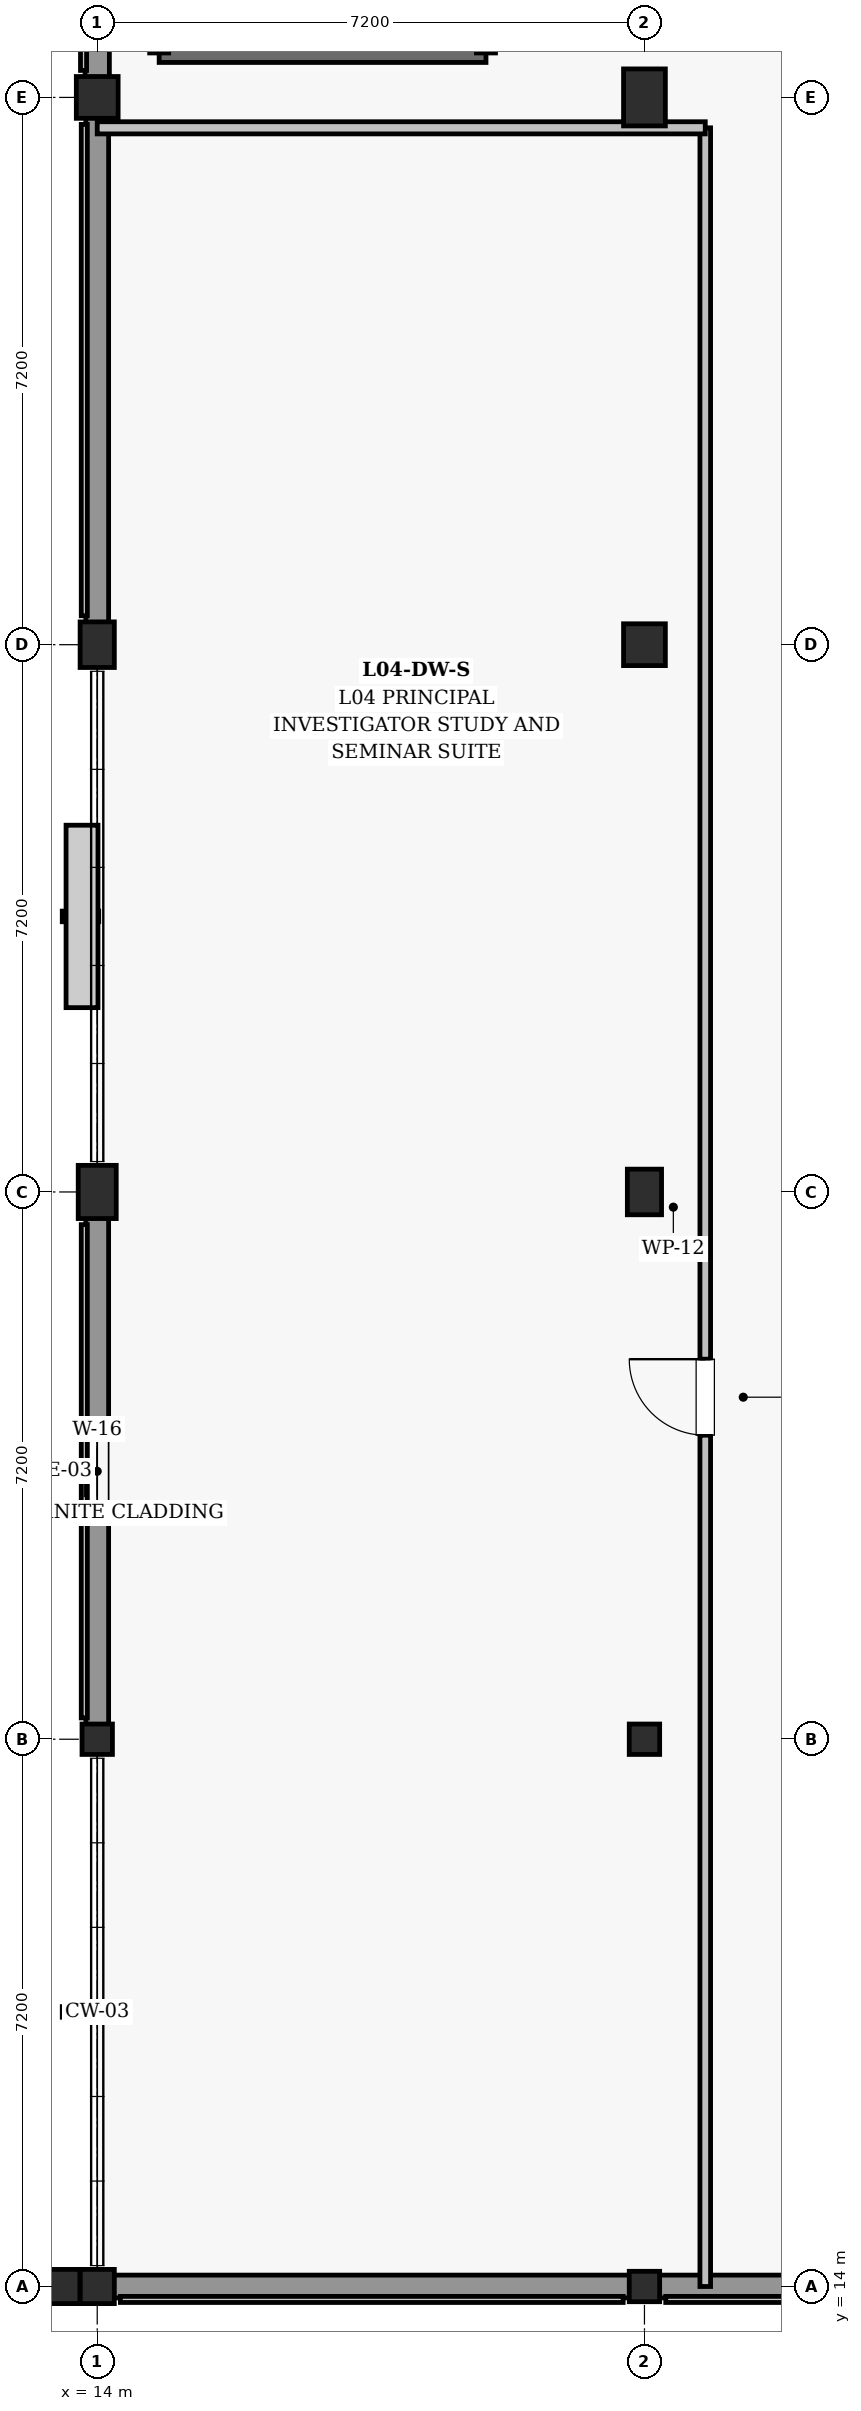
"""IFC4 building model, lengths in metres.
Left out: names, types, materials, properties, quantities, classifications, styles, units other than length and angle.
Written with IfcOpenShell. Run it as: python <this file> out.ifc"""

import sys

from ifc_helpers import new_model, si_unit, direction, frame, frame_2d, origin, origin_2d, place, context, subcontext, project, spatial, rectangle, extrude, element, fill, save


model = new_model("IFC4")
c1 = context("Model", 3, precision=1e-05, world=origin(), true_north=direction((0.0, 1.0)))
c2 = subcontext(c1, "Body", "Model", "MODEL_VIEW")
j1 = project(units=[si_unit("LENGTHUNIT", "METRE"), si_unit("PLANEANGLEUNIT", "RADIAN")], contexts=[c1])
p1 = place(None, origin())
s1 = spatial("IfcSite", under=j1, at=p1, CompositionType="ELEMENT")
p2 = place(p1, origin())
s2 = spatial("IfcBuilding", under=s1, at=p2, CompositionType="ELEMENT")
p3 = place(p2, frame((0.0, 0.0, 18.9)))
s3 = spatial("IfcBuildingStorey", under=s2, at=p3, CompositionType="ELEMENT", Elevation=18.9)
p4 = place(p3, frame((14.0, 14.0, 0.0), z_axis=(0.0, 0.0, 1.0), x_axis=(1.0, 0.0, 0.0)))
e1 = element("IfcColumn", 1, at=p4, inside=s3, PredefinedType="COLUMN", context=c2, shape_type="SweptSolid", body=[
    extrude(rectangle(XDim=0.45, YDim=0.45, at=origin_2d()), origin(), (0.0, 0.0, 1.0), 4.5),
])
p5 = place(p3, frame((14.0, 21.2, 0.0), z_axis=(0.0, 0.0, 1.0), x_axis=(1.0, 0.0, 0.0)))
e2 = element("IfcColumn", 2, at=p5, inside=s3, PredefinedType="COLUMN", context=c2, shape_type="SweptSolid", body=[
    extrude(rectangle(XDim=0.4, YDim=0.4, at=origin_2d()), origin(), (0.0, 0.0, 1.0), 4.5),
])
p6 = place(p3, frame((14.0, 28.4, 0.0), z_axis=(0.0, 0.0, 1.0), x_axis=(1.0, 0.0, 0.0)))
e3 = element("IfcColumn", 3, at=p6, inside=s3, PredefinedType="COLUMN", context=c2, shape_type="SweptSolid", body=[
    extrude(rectangle(XDim=0.5, YDim=0.7, at=origin_2d()), origin(), (0.0, 0.0, 1.0), 4.5),
])
p7 = place(p3, frame((14.0, 35.6, 0.0), z_axis=(0.0, 0.0, 1.0), x_axis=(1.0, 0.0, 0.0)))
e4 = element("IfcColumn", 4, at=p7, inside=s3, PredefinedType="COLUMN", context=c2, shape_type="SweptSolid", body=[
    extrude(rectangle(XDim=0.45, YDim=0.6, at=origin_2d()), origin(), (0.0, 0.0, 1.0), 4.5),
])
p8 = place(p3, frame((14.0, 42.8, 0.0), z_axis=(0.0, 0.0, 1.0), x_axis=(1.0, 0.0, 0.0)))
e5 = element("IfcColumn", 5, at=p8, inside=s3, PredefinedType="COLUMN", context=c2, shape_type="SweptSolid", body=[
    extrude(rectangle(XDim=0.55, YDim=0.55, at=origin_2d()), origin(), (0.0, 0.0, 1.0), 4.5),
])
for number, where, z_axis, x_axis in (
    (6, (21.2, 14.0, 0.0), (0.0, 0.0, 1.0), (1.0, 0.0, 0.0)),
    (7, (21.2, 21.2, 0.0), (0.0, 0.0, 1.0), (1.0, 0.0, 0.0)),
):
    element("IfcColumn", number, at=place(p3, frame(where, z_axis=z_axis, x_axis=x_axis)), inside=s3, PredefinedType="COLUMN", context=c2, shape_type="SweptSolid", body=[
        extrude(rectangle(XDim=0.4, YDim=0.4, at=origin_2d()), origin(), (0.0, 0.0, 1.0), 4.5),
    ])
p9 = place(p3, frame((21.2, 28.4, 0.0), z_axis=(0.0, 0.0, 1.0), x_axis=(1.0, 0.0, 0.0)))
e8 = element("IfcColumn", 8, at=p9, inside=s3, PredefinedType="COLUMN", context=c2, shape_type="SweptSolid", body=[
    extrude(rectangle(XDim=0.45, YDim=0.6, at=origin_2d()), origin(), (0.0, 0.0, 1.0), 4.5),
])
p10 = place(p3, frame((21.2, 35.6, 0.0), z_axis=(0.0, 0.0, 1.0), x_axis=(1.0, 0.0, 0.0)))
e9 = element("IfcColumn", 9, at=p10, inside=s3, PredefinedType="COLUMN", context=c2, shape_type="SweptSolid", body=[
    extrude(rectangle(XDim=0.55, YDim=0.55, at=origin_2d()), origin(), (0.0, 0.0, 1.0), 4.5),
])
p11 = place(p3, frame((21.2, 42.8, 0.0), z_axis=(0.0, 0.0, 1.0), x_axis=(1.0, 0.0, 0.0)))
e10 = element("IfcColumn", 10, at=p11, inside=s3, PredefinedType="COLUMN", context=c2, shape_type="SweptSolid", body=[
    extrude(rectangle(XDim=0.55, YDim=0.75, at=origin_2d()), origin(), (0.0, 0.0, 1.0), 4.5),
])
p12 = place(p3, frame((13.447, 14.0, 0.0), z_axis=(0.0, 0.0, 1.0), x_axis=(0.0, 1.0, 0.0)))
e11 = element("IfcColumn", 11, at=p12, inside=s3, PredefinedType="PILASTER", context=c2, shape_type="SweptSolid", body=[
    extrude(rectangle(XDim=0.45, YDim=0.65, at=origin_2d()), origin(), (0.0, 0.0, 1.0), 4.5),
])
p13 = place(p3, frame((14.0, 21.38, 0.0), z_axis=(0.0, 0.0, 1.0), x_axis=(0.0, 1.0, 0.0)))
e12 = element("IfcWall", 12, at=p13, inside=s3, PredefinedType="SOLIDWALL", context=c2, shape_type="SweptSolid", body=[
    extrude(rectangle(XDim=6.69, YDim=0.3, at=frame_2d((3.345, 0.0))), origin(), (0.0, 0.0, 1.0), 3.455),
])
p14 = place(p13, frame((2.77, 0.0, 0.95)))
e13 = element("IfcOpeningElement", 13, at=p14, cuts=e12, PredefinedType="OPENING", context=c2, shape_type="SweptSolid", body=[
    extrude(rectangle(XDim=1.15, YDim=2.25, at=frame_2d((0.575, 1.125))), frame((0.0, 0.16, 0.0), z_axis=(0.0, -1.0, 0.0), x_axis=(1.0, 0.0, 0.0)), (0.0, 0.0, 1.0), 0.32),
])
p15 = place(p3, frame((14.0, 35.88, 0.0), z_axis=(0.0, 0.0, 1.0), x_axis=(0.0, 1.0, 0.0)))
e14 = element("IfcWall", 14, at=p15, inside=s3, PredefinedType="SOLIDWALL", context=c2, shape_type="SweptSolid", body=[
    extrude(rectangle(XDim=6.665, YDim=0.3, at=frame_2d((3.333, 0.0))), origin(), (0.0, 0.0, 1.0), 3.375),
])
p16 = place(p3, frame((14.0, 43.055, 0.0), z_axis=(0.0, 0.0, 1.0), x_axis=(0.0, 1.0, 0.0)))
e15 = element("IfcWall", 15, at=p16, inside=s3, PredefinedType="SOLIDWALL", context=c2, shape_type="SweptSolid", body=[
    extrude(rectangle(XDim=6.665, YDim=0.32, at=frame_2d((3.333, 0.0))), origin(), (0.0, 0.0, 1.0), 3.375),
])
p17 = place(p3, frame((14.205, 14.0, 0.0), z_axis=(0.0, 0.0, 1.0), x_axis=(1.0, 0.0, 0.0)))
e16 = element("IfcWall", 16, at=p17, inside=s3, PredefinedType="SOLIDWALL", context=c2, shape_type="SweptSolid", body=[
    extrude(rectangle(XDim=6.815, YDim=0.3, at=frame_2d((3.407, 0.0))), origin(), (0.0, 0.0, 1.0), 3.475),
])
p18 = place(p3, frame((21.38, 14.0, 0.0), z_axis=(0.0, 0.0, 1.0), x_axis=(1.0, 0.0, 0.0)))
e17 = element("IfcWall", 17, at=p18, inside=s3, PredefinedType="SOLIDWALL", context=c2, shape_type="SweptSolid", body=[
    extrude(rectangle(XDim=6.79, YDim=0.3, at=frame_2d((3.395, 0.0))), origin(), (0.0, 0.0, 1.0), 3.475),
])
p19 = place(p3, frame((14.815, 43.385, 0.0), z_axis=(0.0, 0.0, 1.0), x_axis=(1.0, 0.0, 0.0)))
e18 = element("IfcWall", 18, at=p19, inside=s3, PredefinedType="SHEAR", context=c2, shape_type="SweptSolid", body=[
    extrude(rectangle(XDim=4.3, YDim=0.25, at=frame_2d((2.15, 0.0))), origin(), (0.0, 0.0, 1.0), 4.195),
])
p20 = place(p3, frame((19.115, 43.385, 0.0), z_axis=(0.0, 0.0, 1.0), x_axis=(0.0, 1.0, 0.0)))
e19 = element("IfcWall", 19, at=p20, inside=s3, PredefinedType="SHEAR", context=c2, shape_type="SweptSolid", body=[
    extrude(rectangle(XDim=10.63, YDim=0.25, at=frame_2d((5.315, 0.0))), origin(), (0.0, 0.0, 1.0), 4.195),
])
p21 = place(p20, frame((0.55, 0.0, 0.0)))
e20 = element("IfcOpeningElement", 20, at=p21, cuts=e19, PredefinedType="OPENING", context=c2, shape_type="SweptSolid", body=[
    extrude(rectangle(XDim=1.2, YDim=2.15, at=frame_2d((0.6, 1.075))), frame((0.0, 0.135, 0.0), z_axis=(0.0, -1.0, 0.0), x_axis=(1.0, 0.0, 0.0)), (0.0, 0.0, 1.0), 0.27),
])
p22 = place(p3, frame((14.815, 54.015, 0.0), z_axis=(0.0, 0.0, 1.0), x_axis=(0.0, -1.0, 0.0)))
e21 = element("IfcWall", 21, at=p22, inside=s3, PredefinedType="SHEAR", context=c2, shape_type="SweptSolid", body=[
    extrude(rectangle(XDim=10.63, YDim=0.25, at=frame_2d((5.315, 0.0))), origin(), (0.0, 0.0, 1.0), 4.195),
])
p23 = place(p3, frame((22.0, 14.0, 0.0), z_axis=(0.0, 0.0, 1.0), x_axis=(0.0, 1.0, 0.0)))
e22 = element("IfcWall", 22, at=p23, inside=s3, PredefinedType="PARTITIONING", context=c2, shape_type="SweptSolid", body=[
    extrude(rectangle(XDim=28.4, YDim=0.14, at=frame_2d((14.2, 0.0))), origin(), (0.0, 0.0, 1.0), 3.48),
])
p24 = place(p23, frame((11.2, 0.0, 0.0)))
e23 = element("IfcOpeningElement", 23, at=p24, cuts=e22, PredefinedType="OPENING", context=c2, shape_type="SweptSolid", body=[
    extrude(rectangle(XDim=1.0, YDim=2.15, at=frame_2d((0.5, 1.075))), frame((0.0, 0.08, 0.0), z_axis=(0.0, -1.0, 0.0), x_axis=(1.0, 0.0, 0.0)), (0.0, 0.0, 1.0), 0.16),
])
p25 = place(p3, frame((14.0, 42.4, 0.0), z_axis=(0.0, 0.0, 1.0), x_axis=(1.0, 0.0, 0.0)))
e24 = element("IfcWall", 24, at=p25, inside=s3, PredefinedType="PARTITIONING", context=c2, shape_type="SweptSolid", body=[
    extrude(rectangle(XDim=8.0, YDim=0.16, at=frame_2d((4.0, 0.0))), origin(), (0.0, 0.0, 1.0), 3.58),
])
p26 = place(p14, origin())
e25 = element("IfcWindow", 25, at=p26, inside=s3, PartitioningType="SINGLE_PANEL", PredefinedType="WINDOW", context=c2, shape_type="SweptSolid", body=[
    extrude(rectangle(XDim=1.15, YDim=2.25, at=frame_2d((0.575, 1.125))), frame((0.0, 0.03, 0.0), z_axis=(0.0, -1.0, 0.0), x_axis=(1.0, 0.0, 0.0)), (0.0, 0.0, 1.0), 0.06),
])
fill(e13, e25)
p27 = place(p24, origin())
e26 = element("IfcDoor", 26, at=p27, inside=s3, OperationType="SINGLE_SWING_RIGHT", PredefinedType="DOOR", context=c2, shape_type="SweptSolid", body=[
    extrude(rectangle(XDim=1.0, YDim=2.15, at=frame_2d((0.5, 1.075))), frame((0.0, 0.025, 0.0), z_axis=(0.0, -1.0, 0.0), x_axis=(1.0, 0.0, 0.0)), (0.0, 0.0, 1.0), 0.05),
])
fill(e23, e26)
save(model, sys.argv[1])
